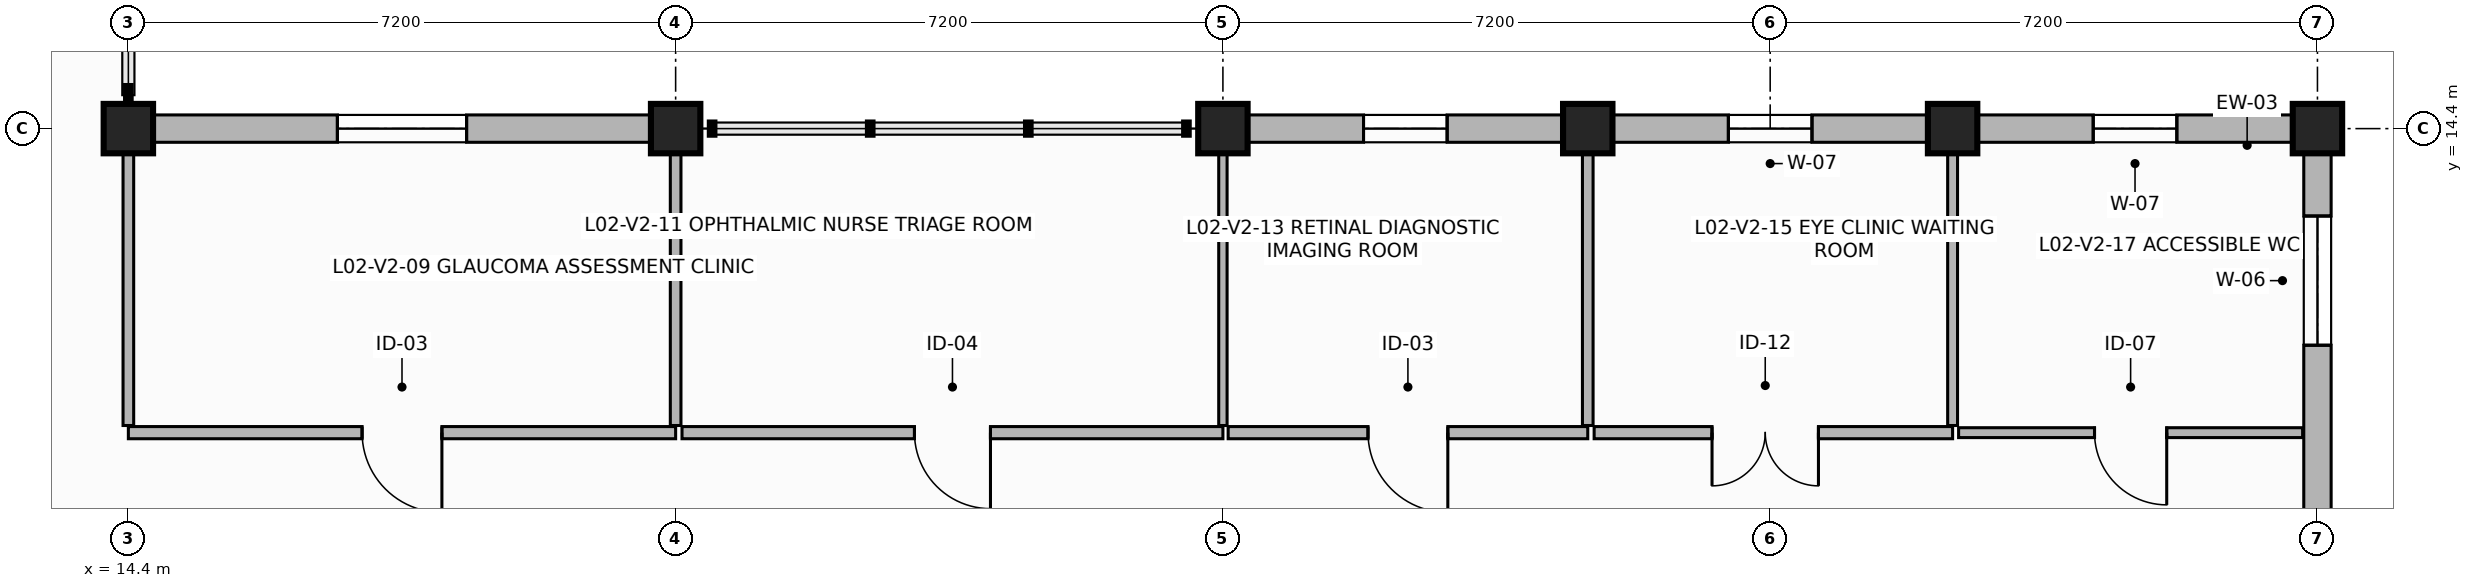
"""IFC4 building model, lengths in metres.
Left out: names, types, materials, properties, quantities, classifications, styles, units other than length and angle.
Written with IfcOpenShell. Run it as: python <this file> out.ifc"""

import sys

from ifc_helpers import new_model, si_unit, direction, frame, frame_2d, origin, origin_2d, place, context, subcontext, project, spatial, rectangle, extrude, element, fill, save


model = new_model("IFC4")
c1 = context("Model", 3, precision=1e-05, world=origin(), true_north=direction((0.0, 1.0)))
c2 = subcontext(c1, "Body", "Model", "MODEL_VIEW")
j1 = project(units=[si_unit("LENGTHUNIT", "METRE"), si_unit("PLANEANGLEUNIT", "RADIAN")], contexts=[c1])
p1 = place(None, origin())
s1 = spatial("IfcSite", under=j1, at=p1, CompositionType="ELEMENT")
p2 = place(p1, origin())
s2 = spatial("IfcBuilding", under=s1, at=p2, CompositionType="ELEMENT")
p3 = place(p2, frame((0.0, 0.0, 8.4)))
s3 = spatial("IfcBuildingStorey", under=s2, at=p3, CompositionType="ELEMENT", Elevation=8.4)
for number, where, z_axis, x_axis in (
    (1, (14.4, 14.4, 0.0), (0.0, 0.0, 1.0), (1.0, 0.0, 0.0)),
    (2, (21.6, 14.4, 0.0), (0.0, 0.0, 1.0), (1.0, 0.0, 0.0)),
    (3, (28.8, 14.4, 0.0), (0.0, 0.0, 1.0), (1.0, 0.0, 0.0)),
    (4, (33.6, 14.4, 0.0), (0.0, 0.0, 1.0), (1.0, 0.0, 0.0)),
    (5, (38.4, 14.4, 0.0), (0.0, 0.0, 1.0), (1.0, 0.0, 0.0)),
    (6, (43.2, 14.4, 0.0), (0.0, 0.0, 1.0), (1.0, 0.0, 0.0)),
):
    element("IfcColumn", number, at=place(p3, frame(where, z_axis=z_axis, x_axis=x_axis)), inside=s3, PredefinedType="COLUMN", context=c2, shape_type="SweptSolid", body=[
        extrude(rectangle(XDim=0.65, YDim=0.65, at=origin_2d()), origin(), (0.0, 0.0, 1.0), 3.62),
    ])
p4 = place(p3, frame((43.2, 7.2, 0.0), z_axis=(0.0, 0.0, 1.0), x_axis=(0.0, 1.0, 0.0)))
e7 = element("IfcWall", 7, at=p4, inside=s3, PredefinedType="SOLIDWALL", context=c2, shape_type="SweptSolid", body=[
    extrude(rectangle(XDim=7.2, YDim=0.36, at=frame_2d((3.6, 0.0))), origin(), (0.0, 0.0, 1.0), 3.0),
])
p5 = place(p4, frame((4.35, 0.0, 0.85)))
e8 = element("IfcOpeningElement", 8, at=p5, cuts=e7, PredefinedType="OPENING", context=c2, shape_type="SweptSolid", body=[
    extrude(rectangle(XDim=1.7, YDim=1.9, at=frame_2d((0.85, 0.95))), frame((0.0, 0.19, 0.0), z_axis=(0.0, -1.0, 0.0), x_axis=(1.0, 0.0, 0.0)), (0.0, 0.0, 1.0), 0.38),
])
p6 = place(p3, frame((43.2, 14.4, 0.0), z_axis=(0.0, 0.0, 1.0), x_axis=(-1.0, 0.0, 0.0)))
e9 = element("IfcWall", 9, at=p6, inside=s3, PredefinedType="SOLIDWALL", context=c2, shape_type="SweptSolid", body=[
    extrude(rectangle(XDim=4.8, YDim=0.36, at=frame_2d((2.4, 0.0))), origin(), (0.0, 0.0, 1.0), 3.0),
])
p7 = place(p6, frame((1.85, 0.0, 0.85)))
e10 = element("IfcOpeningElement", 10, at=p7, cuts=e9, PredefinedType="OPENING", context=c2, shape_type="SweptSolid", body=[
    extrude(rectangle(XDim=1.1, YDim=1.85, at=frame_2d((0.55, 0.925))), frame((0.0, 0.19, 0.0), z_axis=(0.0, -1.0, 0.0), x_axis=(1.0, 0.0, 0.0)), (0.0, 0.0, 1.0), 0.38),
])
p8 = place(p3, frame((38.4, 14.4, 0.0), z_axis=(0.0, 0.0, 1.0), x_axis=(-1.0, 0.0, 0.0)))
e11 = element("IfcWall", 11, at=p8, inside=s3, PredefinedType="SOLIDWALL", context=c2, shape_type="SweptSolid", body=[
    extrude(rectangle(XDim=4.8, YDim=0.36, at=frame_2d((2.4, 0.0))), origin(), (0.0, 0.0, 1.0), 3.0),
])
p9 = place(p8, frame((1.85, 0.0, 0.85)))
e12 = element("IfcOpeningElement", 12, at=p9, cuts=e11, PredefinedType="OPENING", context=c2, shape_type="SweptSolid", body=[
    extrude(rectangle(XDim=1.1, YDim=1.85, at=frame_2d((0.55, 0.925))), frame((0.0, 0.19, 0.0), z_axis=(0.0, -1.0, 0.0), x_axis=(1.0, 0.0, 0.0)), (0.0, 0.0, 1.0), 0.38),
])
p10 = place(p3, frame((33.6, 14.4, 0.0), z_axis=(0.0, 0.0, 1.0), x_axis=(-1.0, 0.0, 0.0)))
e13 = element("IfcWall", 13, at=p10, inside=s3, PredefinedType="SOLIDWALL", context=c2, shape_type="SweptSolid", body=[
    extrude(rectangle(XDim=4.8, YDim=0.36, at=frame_2d((2.4, 0.0))), origin(), (0.0, 0.0, 1.0), 3.0),
])
p11 = place(p10, frame((1.85, 0.0, 0.85)))
e14 = element("IfcOpeningElement", 14, at=p11, cuts=e13, PredefinedType="OPENING", context=c2, shape_type="SweptSolid", body=[
    extrude(rectangle(XDim=1.1, YDim=1.85, at=frame_2d((0.55, 0.925))), frame((0.0, 0.19, 0.0), z_axis=(0.0, -1.0, 0.0), x_axis=(1.0, 0.0, 0.0)), (0.0, 0.0, 1.0), 0.38),
])
p12 = place(p3, frame((21.6, 14.4, 0.0), z_axis=(0.0, 0.0, 1.0), x_axis=(-1.0, 0.0, 0.0)))
e15 = element("IfcWall", 15, at=p12, inside=s3, PredefinedType="SOLIDWALL", context=c2, shape_type="SweptSolid", body=[
    extrude(rectangle(XDim=7.2, YDim=0.36, at=frame_2d((3.6, 0.0))), origin(), (0.0, 0.0, 1.0), 3.0),
])
p13 = place(p12, frame((2.75, 0.0, 0.85)))
e16 = element("IfcOpeningElement", 16, at=p13, cuts=e15, PredefinedType="OPENING", context=c2, shape_type="SweptSolid", body=[
    extrude(rectangle(XDim=1.7, YDim=1.9, at=frame_2d((0.85, 0.95))), frame((0.0, 0.19, 0.0), z_axis=(0.0, -1.0, 0.0), x_axis=(1.0, 0.0, 0.0)), (0.0, 0.0, 1.0), 0.38),
])
p14 = place(p3, frame((21.6, 10.4, 0.0), z_axis=(0.0, 0.0, 1.0), x_axis=(-1.0, 0.0, 0.0)))
e17 = element("IfcWall", 17, at=p14, inside=s3, PredefinedType="PARTITIONING", context=c2, shape_type="SweptSolid", body=[
    extrude(rectangle(XDim=7.2, YDim=0.16, at=frame_2d((3.6, 0.0))), origin(), (0.0, 0.0, 1.0), 2.98),
])
p15 = place(p14, frame((3.075, 0.0, 0.0)))
e18 = element("IfcOpeningElement", 18, at=p15, cuts=e17, PredefinedType="OPENING", context=c2, shape_type="SweptSolid", body=[
    extrude(rectangle(XDim=1.05, YDim=2.15, at=frame_2d((0.525, 1.075))), frame((0.0, 0.09, 0.0), z_axis=(0.0, -1.0, 0.0), x_axis=(1.0, 0.0, 0.0)), (0.0, 0.0, 1.0), 0.18),
])
for number, where, z_axis, x_axis in (
    (19, (14.4, 10.494, 0.0), (0.0, 0.0, 1.0), (0.0, 1.0, 0.0)),
    (20, (21.6, 14.205, 0.0), (0.0, 0.0, 1.0), (0.0, -1.0, 0.0)),
):
    element("IfcWall", number, at=place(p3, frame(where, z_axis=z_axis, x_axis=x_axis)), inside=s3, PredefinedType="PARTITIONING", context=c2, shape_type="SweptSolid", body=[
        extrude(rectangle(XDim=3.711, YDim=0.14, at=frame_2d((1.855, 0.0))), origin(), (0.0, 0.0, 1.0), 2.98),
    ])
p16 = place(p3, frame((28.8, 10.4, 0.0), z_axis=(0.0, 0.0, 1.0), x_axis=(-1.0, 0.0, 0.0)))
e21 = element("IfcWall", 21, at=p16, inside=s3, PredefinedType="PARTITIONING", context=c2, shape_type="SweptSolid", body=[
    extrude(rectangle(XDim=7.116, YDim=0.16, at=frame_2d((3.558, 0.0))), origin(), (0.0, 0.0, 1.0), 2.98),
])
p17 = place(p16, frame((3.058, 0.0, 0.0)))
e22 = element("IfcOpeningElement", 22, at=p17, cuts=e21, PredefinedType="OPENING", context=c2, shape_type="SweptSolid", body=[
    extrude(rectangle(XDim=1.0, YDim=2.15, at=frame_2d((0.5, 1.075))), frame((0.0, 0.09, 0.0), z_axis=(0.0, -1.0, 0.0), x_axis=(1.0, 0.0, 0.0)), (0.0, 0.0, 1.0), 0.18),
])
p18 = place(p3, frame((28.8, 14.205, 0.0), z_axis=(0.0, 0.0, 1.0), x_axis=(0.0, -1.0, 0.0)))
e23 = element("IfcWall", 23, at=p18, inside=s3, PredefinedType="PARTITIONING", context=c2, shape_type="SweptSolid", body=[
    extrude(rectangle(XDim=3.711, YDim=0.11, at=frame_2d((1.855, 0.0))), origin(), (0.0, 0.0, 1.0), 2.98),
])
p19 = place(p3, frame((33.6, 10.4, 0.0), z_axis=(0.0, 0.0, 1.0), x_axis=(-1.0, 0.0, 0.0)))
e24 = element("IfcWall", 24, at=p19, inside=s3, PredefinedType="PARTITIONING", context=c2, shape_type="SweptSolid", body=[
    extrude(rectangle(XDim=4.731, YDim=0.16, at=frame_2d((2.366, 0.0))), origin(), (0.0, 0.0, 1.0), 2.98),
])
p20 = place(p19, frame((1.841, 0.0, 0.0)))
e25 = element("IfcOpeningElement", 25, at=p20, cuts=e24, PredefinedType="OPENING", context=c2, shape_type="SweptSolid", body=[
    extrude(rectangle(XDim=1.05, YDim=2.15, at=frame_2d((0.525, 1.075))), frame((0.0, 0.09, 0.0), z_axis=(0.0, -1.0, 0.0), x_axis=(1.0, 0.0, 0.0)), (0.0, 0.0, 1.0), 0.18),
])
p21 = place(p3, frame((33.6, 14.205, 0.0), z_axis=(0.0, 0.0, 1.0), x_axis=(0.0, -1.0, 0.0)))
e26 = element("IfcWall", 26, at=p21, inside=s3, PredefinedType="PARTITIONING", context=c2, shape_type="SweptSolid", body=[
    extrude(rectangle(XDim=3.711, YDim=0.14, at=frame_2d((1.855, 0.0))), origin(), (0.0, 0.0, 1.0), 2.98),
])
p22 = place(p3, frame((38.4, 10.4, 0.0), z_axis=(0.0, 0.0, 1.0), x_axis=(-1.0, 0.0, 0.0)))
e27 = element("IfcWall", 27, at=p22, inside=s3, PredefinedType="PARTITIONING", context=c2, shape_type="SweptSolid", body=[
    extrude(rectangle(XDim=4.716, YDim=0.16, at=frame_2d((2.358, 0.0))), origin(), (0.0, 0.0, 1.0), 2.98),
])
p23 = place(p22, frame((1.765, 0.0, 0.0)))
e28 = element("IfcOpeningElement", 28, at=p23, cuts=e27, PredefinedType="OPENING", context=c2, shape_type="SweptSolid", body=[
    extrude(rectangle(XDim=1.4, YDim=2.3, at=frame_2d((0.7, 1.15))), frame((0.0, 0.09, 0.0), z_axis=(0.0, -1.0, 0.0), x_axis=(1.0, 0.0, 0.0)), (0.0, 0.0, 1.0), 0.18),
])
p24 = place(p3, frame((38.4, 14.205, 0.0), z_axis=(0.0, 0.0, 1.0), x_axis=(0.0, -1.0, 0.0)))
e29 = element("IfcWall", 29, at=p24, inside=s3, PredefinedType="PARTITIONING", context=c2, shape_type="SweptSolid", body=[
    extrude(rectangle(XDim=3.711, YDim=0.13, at=frame_2d((1.855, 0.0))), origin(), (0.0, 0.0, 1.0), 2.98),
])
p25 = place(p3, frame((43.005, 10.4, 0.0), z_axis=(0.0, 0.0, 1.0), x_axis=(-1.0, 0.0, 0.0)))
e30 = element("IfcWall", 30, at=p25, inside=s3, PredefinedType="PARTITIONING", context=c2, shape_type="SweptSolid", body=[
    extrude(rectangle(XDim=4.526, YDim=0.13, at=frame_2d((2.263, 0.0))), origin(), (0.0, 0.0, 1.0), 2.98),
])
p26 = place(p25, frame((1.788, 0.0, 0.0)))
e31 = element("IfcOpeningElement", 31, at=p26, cuts=e30, PredefinedType="OPENING", context=c2, shape_type="SweptSolid", body=[
    extrude(rectangle(XDim=0.95, YDim=2.1, at=frame_2d((0.475, 1.05))), frame((0.0, 0.075, 0.0), z_axis=(0.0, -1.0, 0.0), x_axis=(1.0, 0.0, 0.0)), (0.0, 0.0, 1.0), 0.15),
])
p27 = place(p5, origin())
e32 = element("IfcWindow", 32, at=p27, inside=s3, PartitioningType="SINGLE_PANEL", PredefinedType="WINDOW", context=c2, shape_type="SweptSolid", body=[
    extrude(rectangle(XDim=1.7, YDim=1.9, at=frame_2d((0.85, 0.95))), frame((0.0, 0.03, 0.0), z_axis=(0.0, -1.0, 0.0), x_axis=(1.0, 0.0, 0.0)), (0.0, 0.0, 1.0), 0.06),
])
fill(e8, e32)
p28 = place(p7, origin())
e33 = element("IfcWindow", 33, at=p28, inside=s3, PartitioningType="SINGLE_PANEL", PredefinedType="WINDOW", context=c2, shape_type="SweptSolid", body=[
    extrude(rectangle(XDim=1.1, YDim=1.85, at=frame_2d((0.55, 0.925))), frame((0.0, 0.03, 0.0), z_axis=(0.0, -1.0, 0.0), x_axis=(1.0, 0.0, 0.0)), (0.0, 0.0, 1.0), 0.06),
])
fill(e10, e33)
p29 = place(p9, origin())
e34 = element("IfcWindow", 34, at=p29, inside=s3, PartitioningType="SINGLE_PANEL", PredefinedType="WINDOW", context=c2, shape_type="SweptSolid", body=[
    extrude(rectangle(XDim=1.1, YDim=1.85, at=frame_2d((0.55, 0.925))), frame((0.0, 0.03, 0.0), z_axis=(0.0, -1.0, 0.0), x_axis=(1.0, 0.0, 0.0)), (0.0, 0.0, 1.0), 0.06),
])
fill(e12, e34)
p30 = place(p11, origin())
e35 = element("IfcWindow", 35, at=p30, inside=s3, PartitioningType="SINGLE_PANEL", PredefinedType="WINDOW", context=c2, shape_type="SweptSolid", body=[
    extrude(rectangle(XDim=1.1, YDim=1.85, at=frame_2d((0.55, 0.925))), frame((0.0, 0.03, 0.0), z_axis=(0.0, -1.0, 0.0), x_axis=(1.0, 0.0, 0.0)), (0.0, 0.0, 1.0), 0.06),
])
fill(e14, e35)
p31 = place(p13, origin())
e36 = element("IfcWindow", 36, at=p31, inside=s3, PartitioningType="SINGLE_PANEL", PredefinedType="WINDOW", context=c2, shape_type="SweptSolid", body=[
    extrude(rectangle(XDim=1.7, YDim=1.9, at=frame_2d((0.85, 0.95))), frame((0.0, 0.03, 0.0), z_axis=(0.0, -1.0, 0.0), x_axis=(1.0, 0.0, 0.0)), (0.0, 0.0, 1.0), 0.06),
])
fill(e16, e36)
p32 = place(p15, origin())
e37 = element("IfcDoor", 37, at=p32, inside=s3, OperationType="SINGLE_SWING_LEFT", PredefinedType="DOOR", context=c2, shape_type="SweptSolid", body=[
    extrude(rectangle(XDim=1.05, YDim=2.15, at=frame_2d((0.525, 1.075))), frame((0.0, 0.025, 0.0), z_axis=(0.0, -1.0, 0.0), x_axis=(1.0, 0.0, 0.0)), (0.0, 0.0, 1.0), 0.05),
])
fill(e18, e37)
p33 = place(p17, origin())
e38 = element("IfcDoor", 38, at=p33, inside=s3, OperationType="SINGLE_SWING_LEFT", PredefinedType="DOOR", context=c2, shape_type="SweptSolid", body=[
    extrude(rectangle(XDim=1.0, YDim=2.15, at=frame_2d((0.5, 1.075))), frame((0.0, 0.025, 0.0), z_axis=(0.0, -1.0, 0.0), x_axis=(1.0, 0.0, 0.0)), (0.0, 0.0, 1.0), 0.05),
])
fill(e22, e38)
p34 = place(p20, origin())
e39 = element("IfcDoor", 39, at=p34, inside=s3, OperationType="SINGLE_SWING_LEFT", PredefinedType="DOOR", context=c2, shape_type="SweptSolid", body=[
    extrude(rectangle(XDim=1.05, YDim=2.15, at=frame_2d((0.525, 1.075))), frame((0.0, 0.025, 0.0), z_axis=(0.0, -1.0, 0.0), x_axis=(1.0, 0.0, 0.0)), (0.0, 0.0, 1.0), 0.05),
])
fill(e25, e39)
p35 = place(p23, origin())
e40 = element("IfcDoor", 40, at=p35, inside=s3, OperationType="DOUBLE_DOOR_SINGLE_SWING", PredefinedType="DOOR", context=c2, shape_type="SweptSolid", body=[
    extrude(rectangle(XDim=1.4, YDim=2.3, at=frame_2d((0.7, 1.15))), frame((0.0, 0.025, 0.0), z_axis=(0.0, -1.0, 0.0), x_axis=(1.0, 0.0, 0.0)), (0.0, 0.0, 1.0), 0.05),
])
fill(e28, e40)
p36 = place(p26, origin())
e41 = element("IfcDoor", 41, at=p36, inside=s3, OperationType="SINGLE_SWING_LEFT", PredefinedType="DOOR", context=c2, shape_type="SweptSolid", body=[
    extrude(rectangle(XDim=0.95, YDim=2.1, at=frame_2d((0.475, 1.05))), frame((0.0, 0.025, 0.0), z_axis=(0.0, -1.0, 0.0), x_axis=(1.0, 0.0, 0.0)), (0.0, 0.0, 1.0), 0.05),
])
fill(e31, e41)
save(model, sys.argv[1])
